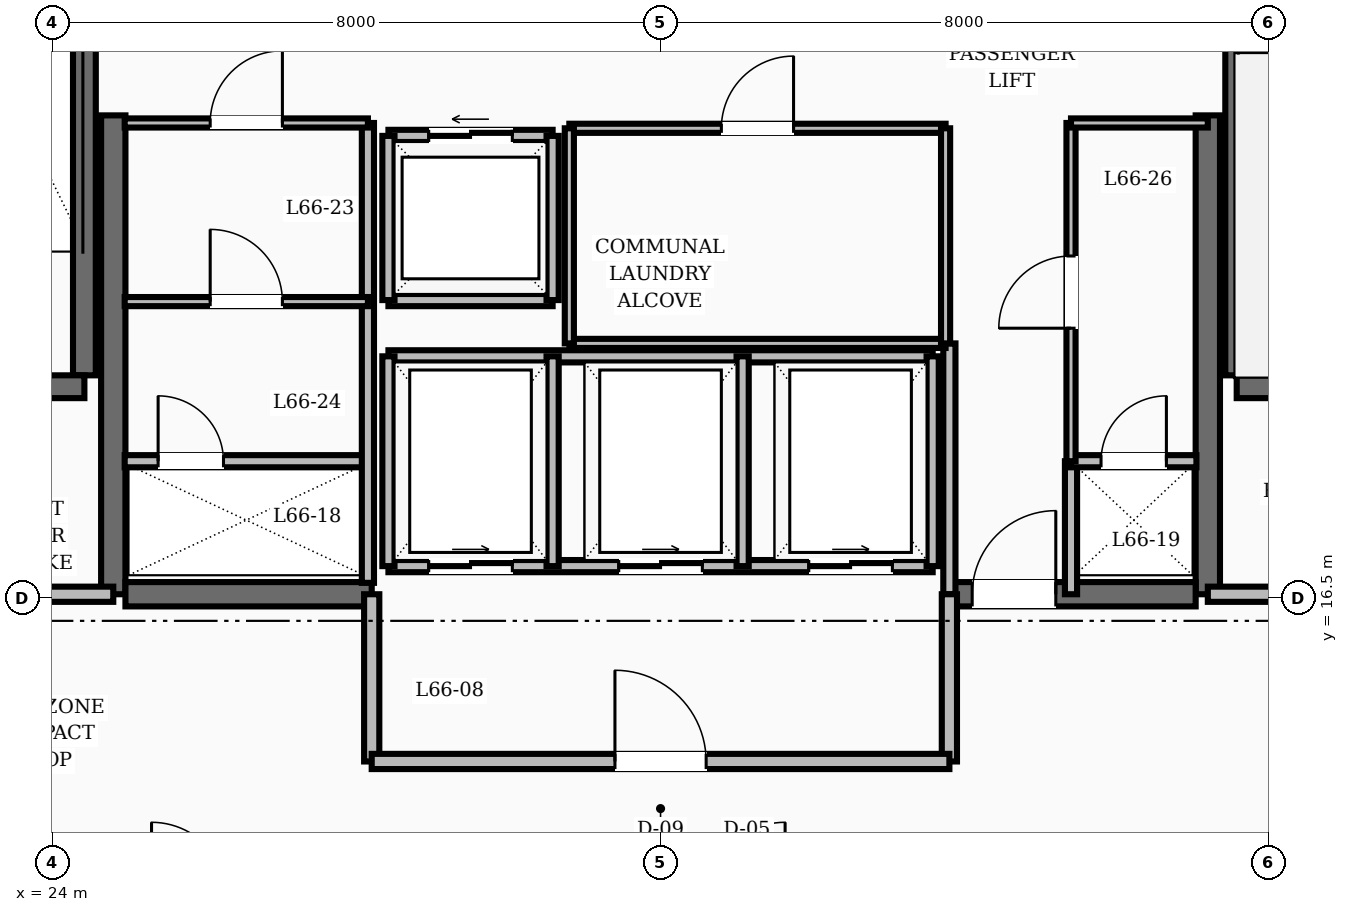
"""IFC4 building model, lengths in metres.
Left out: names, types, materials, properties, quantities, classifications, styles, units other than length and angle.
Written with IfcOpenShell. Run it as: python <this file> out.ifc"""

import sys

from ifc_helpers import new_model, si_unit, direction, frame, frame_2d, origin, place, context, subcontext, project, spatial, rectangle, extrude, element, fill, save


model = new_model("IFC4")
c1 = context("Model", 3, precision=1e-05, world=origin(), true_north=direction((0.0, 1.0)))
c2 = subcontext(c1, "Body", "Model", "MODEL_VIEW")
j1 = project(units=[si_unit("LENGTHUNIT", "METRE"), si_unit("PLANEANGLEUNIT", "RADIAN")], contexts=[c1])
p1 = place(None, origin())
s1 = spatial("IfcSite", under=j1, at=p1, CompositionType="ELEMENT")
p2 = place(p1, origin())
s2 = spatial("IfcBuilding", under=s1, at=p2, CompositionType="ELEMENT")
p3 = place(p2, frame((0.0, 0.0, 254.4)))
s3 = spatial("IfcBuildingStorey", under=s2, at=p3, CompositionType="ELEMENT", Elevation=254.4)
for number, where, z_axis, x_axis in (
    (1, (24.8, 16.55, 0.0), (0.0, 0.0, 1.0), (0.0, 1.0, 0.0)),
    (2, (39.2, 16.55, 0.0), (0.0, 0.0, 1.0), (0.0, 1.0, 0.0)),
):
    element("IfcWall", number, at=place(p3, frame(where, z_axis=z_axis, x_axis=x_axis)), inside=s3, PredefinedType="SHEAR", context=c2, shape_type="SweptSolid", body=[
        extrude(rectangle(XDim=6.3, YDim=0.32, at=frame_2d((3.15, 0.0))), origin(), (0.0, 0.0, 1.0), 3.6),
    ])
p4 = place(p3, frame((24.96, 16.55, 0.0), z_axis=(0.0, 0.0, 1.0), x_axis=(1.0, 0.0, 0.0)))
e3 = element("IfcWall", 3, at=p4, inside=s3, PredefinedType="SHEAR", context=c2, shape_type="SweptSolid", body=[
    extrude(rectangle(XDim=3.24, YDim=0.32, at=frame_2d((1.62, 0.0))), origin(), (0.0, 0.0, 1.0), 3.6),
])
p5 = place(p3, frame((35.8, 16.55, 0.0), z_axis=(0.0, 0.0, 1.0), x_axis=(1.0, 0.0, 0.0)))
e4 = element("IfcWall", 4, at=p5, inside=s3, PredefinedType="SHEAR", context=c2, shape_type="SweptSolid", body=[
    extrude(rectangle(XDim=3.24, YDim=0.32, at=frame_2d((1.62, 0.0))), origin(), (0.0, 0.0, 1.0), 3.6),
])
p6 = place(p5, frame((0.3, 0.0, 0.0)))
e5 = element("IfcOpeningElement", 5, at=p6, cuts=e4, PredefinedType="OPENING", context=c2, shape_type="SweptSolid", body=[
    extrude(rectangle(XDim=1.1, YDim=2.1, at=frame_2d((0.55, 1.05))), frame((0.0, 0.17, 0.0), z_axis=(0.0, -1.0, 0.0), x_axis=(1.0, 0.0, 0.0)), (0.0, 0.0, 1.0), 0.34),
])
p7 = place(p3, frame((24.42, 19.43, 0.0), z_axis=(0.0, 0.0, 1.0), x_axis=(0.0, 1.0, 0.0)))
e6 = element("IfcWall", 6, at=p7, inside=s3, PredefinedType="SHEAR", context=c2, shape_type="SweptSolid", body=[
    extrude(rectangle(XDim=8.74, YDim=0.3, at=frame_2d((4.37, 0.0))), origin(), (0.0, 0.0, 1.0), 3.6),
])
p8 = place(p3, frame((20.82, 19.28, 0.0), z_axis=(0.0, 0.0, 1.0), x_axis=(1.0, 0.0, 0.0)))
e7 = element("IfcWall", 7, at=p8, inside=s3, PredefinedType="SHEAR", context=c2, shape_type="SweptSolid", body=[
    extrude(rectangle(XDim=3.6, YDim=0.3, at=frame_2d((1.8, 0.0))), origin(), (0.0, 0.0, 1.0), 3.6),
])
p9 = place(p8, frame((1.3, 0.0, 0.0)))
e8 = element("IfcOpeningElement", 8, at=p9, cuts=e7, PredefinedType="OPENING", context=c2, shape_type="SweptSolid", body=[
    extrude(rectangle(XDim=1.1, YDim=2.1, at=frame_2d((0.55, 1.05))), frame((0.0, 0.16, 0.0), z_axis=(0.0, -1.0, 0.0), x_axis=(1.0, 0.0, 0.0)), (0.0, 0.0, 1.0), 0.32),
])
p10 = place(p3, frame((39.58, 19.43, 0.0), z_axis=(0.0, 0.0, 1.0), x_axis=(0.0, 1.0, 0.0)))
e9 = element("IfcWall", 9, at=p10, inside=s3, PredefinedType="SHEAR", context=c2, shape_type="SweptSolid", body=[
    extrude(rectangle(XDim=8.74, YDim=0.3, at=frame_2d((4.37, 0.0))), origin(), (0.0, 0.0, 1.0), 3.6),
])
p11 = place(p3, frame((39.58, 19.28, 0.0), z_axis=(0.0, 0.0, 1.0), x_axis=(1.0, 0.0, 0.0)))
e10 = element("IfcWall", 10, at=p11, inside=s3, PredefinedType="SHEAR", context=c2, shape_type="SweptSolid", body=[
    extrude(rectangle(XDim=3.6, YDim=0.3, at=frame_2d((1.8, 0.0))), origin(), (0.0, 0.0, 1.0), 3.6),
])
for number, where, z_axis, x_axis in (
    (11, (20.82, 16.55, 0.0), (0.0, 0.0, 1.0), (1.0, 0.0, 0.0)),
    (12, (39.2, 16.55, 0.0), (0.0, 0.0, 1.0), (1.0, 0.0, 0.0)),
):
    element("IfcWall", number, at=place(p3, frame(where, z_axis=z_axis, x_axis=x_axis)), inside=s3, PredefinedType="SOLIDWALL", context=c2, shape_type="SweptSolid", body=[
        extrude(rectangle(XDim=3.98, YDim=0.2, at=frame_2d((1.99, 0.0))), origin(), (0.0, 0.0, 1.0), 2.87),
    ])
p12 = place(p3, frame((35.8, 16.55, 0.0), z_axis=(0.0, 0.0, 1.0), x_axis=(0.0, 1.0, 0.0)))
e13 = element("IfcWall", 13, at=p12, inside=s3, PredefinedType="SOLIDWALL", context=c2, shape_type="SweptSolid", body=[
    extrude(rectangle(XDim=3.3, YDim=0.16, at=frame_2d((1.65, 0.0))), origin(), (0.0, 0.0, 1.0), 2.87),
])
p13 = place(p3, frame((37.4, 16.55, 0.0), z_axis=(0.0, 0.0, 1.0), x_axis=(0.0, 1.0, 0.0)))
e14 = element("IfcWall", 14, at=p13, inside=s3, PredefinedType="SOLIDWALL", context=c2, shape_type="SweptSolid", body=[
    extrude(rectangle(XDim=1.75, YDim=0.16, at=frame_2d((0.875, 0.0))), origin(), (0.0, 0.0, 1.0), 2.87),
])
for number, where, z_axis, x_axis in (
    (15, (28.2, 14.35, 0.0), (0.0, 0.0, 1.0), (0.0, 1.0, 0.0)),
    (16, (35.8, 14.35, 0.0), (0.0, 0.0, 1.0), (0.0, 1.0, 0.0)),
):
    element("IfcWall", number, at=place(p3, frame(where, z_axis=z_axis, x_axis=x_axis)), inside=s3, PredefinedType="SOLIDWALL", context=c2, shape_type="SweptSolid", body=[
        extrude(rectangle(XDim=2.2, YDim=0.2, at=frame_2d((1.1, 0.0))), origin(), (0.0, 0.0, 1.0), 2.87),
    ])
p14 = place(p3, frame((28.2, 14.35, 0.0), z_axis=(0.0, 0.0, 1.0), x_axis=(1.0, 0.0, 0.0)))
e17 = element("IfcWall", 17, at=p14, inside=s3, PredefinedType="SOLIDWALL", context=c2, shape_type="SweptSolid", body=[
    extrude(rectangle(XDim=7.6, YDim=0.2, at=frame_2d((3.8, 0.0))), origin(), (0.0, 0.0, 1.0), 2.87),
])
p15 = place(p14, frame((3.2, 0.0, 0.0)))
e18 = element("IfcOpeningElement", 18, at=p15, cuts=e17, PredefinedType="OPENING", context=c2, shape_type="SweptSolid", body=[
    extrude(rectangle(XDim=1.2, YDim=2.1, at=frame_2d((0.6, 1.05))), frame((0.0, 0.11, 0.0), z_axis=(0.0, -1.0, 0.0), x_axis=(1.0, 0.0, 0.0)), (0.0, 0.0, 1.0), 0.22),
])
p16 = place(p3, frame((28.42, 22.58, 0.0), z_axis=(0.0, 0.0, 1.0), x_axis=(1.0, 0.0, 0.0)))
e19 = element("IfcWall", 19, at=p16, inside=s3, PredefinedType="SOLIDWALL", context=c2, shape_type="SweptSolid", body=[
    extrude(rectangle(XDim=2.16, YDim=0.16, at=frame_2d((1.08, 0.0))), origin(), (0.0, 0.0, 1.0), 2.87),
])
p17 = place(p16, frame((0.53, 0.0, 0.0)))
e20 = element("IfcOpeningElement", 20, at=p17, cuts=e19, PredefinedType="OPENING", context=c2, shape_type="SweptSolid", body=[
    extrude(rectangle(XDim=1.1, YDim=2.15, at=frame_2d((0.55, 1.075))), frame((0.0, 0.09, 0.0), z_axis=(0.0, -1.0, 0.0), x_axis=(1.0, 0.0, 0.0)), (0.0, 0.0, 1.0), 0.18),
])
for number, where, z_axis, x_axis in (
    (21, (28.42, 20.42, 0.0), (0.0, 0.0, 1.0), (1.0, 0.0, 0.0)),
    (22, (28.42, 20.42, 0.0), (0.0, 0.0, 1.0), (0.0, 1.0, 0.0)),
    (23, (30.58, 20.42, 0.0), (0.0, 0.0, 1.0), (0.0, 1.0, 0.0)),
):
    element("IfcWall", number, at=place(p3, frame(where, z_axis=z_axis, x_axis=x_axis)), inside=s3, PredefinedType="SOLIDWALL", context=c2, shape_type="SweptSolid", body=[
        extrude(rectangle(XDim=2.16, YDim=0.16, at=frame_2d((1.08, 0.0))), origin(), (0.0, 0.0, 1.0), 2.87),
    ])
p18 = place(p3, frame((28.42, 16.92, 0.0), z_axis=(0.0, 0.0, 1.0), x_axis=(1.0, 0.0, 0.0)))
e24 = element("IfcWall", 24, at=p18, inside=s3, PredefinedType="SOLIDWALL", context=c2, shape_type="SweptSolid", body=[
    extrude(rectangle(XDim=7.16, YDim=0.16, at=frame_2d((3.58, 0.0))), origin(), (0.0, 0.0, 1.0), 2.87),
])
p19 = place(p18, frame((0.53, 0.0, 0.0)))
e25 = element("IfcOpeningElement", 25, at=p19, cuts=e24, PredefinedType="OPENING", context=c2, shape_type="SweptSolid", body=[
    extrude(rectangle(XDim=1.1, YDim=2.15, at=frame_2d((0.55, 1.075))), frame((0.0, 0.09, 0.0), z_axis=(0.0, -1.0, 0.0), x_axis=(1.0, 0.0, 0.0)), (0.0, 0.0, 1.0), 0.18),
])
p20 = place(p18, frame((3.03, 0.0, 0.0)))
e26 = element("IfcOpeningElement", 26, at=p20, cuts=e24, PredefinedType="OPENING", context=c2, shape_type="SweptSolid", body=[
    extrude(rectangle(XDim=1.1, YDim=2.15, at=frame_2d((0.55, 1.075))), frame((0.0, 0.09, 0.0), z_axis=(0.0, -1.0, 0.0), x_axis=(1.0, 0.0, 0.0)), (0.0, 0.0, 1.0), 0.18),
])
p21 = place(p18, frame((5.53, 0.0, 0.0)))
e27 = element("IfcOpeningElement", 27, at=p21, cuts=e24, PredefinedType="OPENING", context=c2, shape_type="SweptSolid", body=[
    extrude(rectangle(XDim=1.1, YDim=2.15, at=frame_2d((0.55, 1.075))), frame((0.0, 0.09, 0.0), z_axis=(0.0, -1.0, 0.0), x_axis=(1.0, 0.0, 0.0)), (0.0, 0.0, 1.0), 0.18),
])
p22 = place(p3, frame((28.42, 19.68, 0.0), z_axis=(0.0, 0.0, 1.0), x_axis=(1.0, 0.0, 0.0)))
e28 = element("IfcWall", 28, at=p22, inside=s3, PredefinedType="SOLIDWALL", context=c2, shape_type="SweptSolid", body=[
    extrude(rectangle(XDim=7.16, YDim=0.16, at=frame_2d((3.58, 0.0))), origin(), (0.0, 0.0, 1.0), 2.87),
])
for number, where, z_axis, x_axis in (
    (29, (28.42, 16.92, 0.0), (0.0, 0.0, 1.0), (0.0, 1.0, 0.0)),
    (30, (30.58, 16.92, 0.0), (0.0, 0.0, 1.0), (0.0, 1.0, 0.0)),
    (31, (33.08, 16.92, 0.0), (0.0, 0.0, 1.0), (0.0, 1.0, 0.0)),
    (32, (35.58, 16.92, 0.0), (0.0, 0.0, 1.0), (0.0, 1.0, 0.0)),
):
    element("IfcWall", number, at=place(p3, frame(where, z_axis=z_axis, x_axis=x_axis)), inside=s3, PredefinedType="SOLIDWALL", context=c2, shape_type="SweptSolid", body=[
        extrude(rectangle(XDim=2.76, YDim=0.16, at=frame_2d((1.38, 0.0))), origin(), (0.0, 0.0, 1.0), 2.87),
    ])
p23 = place(p3, frame((30.8, 22.68, 0.0), z_axis=(0.0, 0.0, 1.0), x_axis=(1.0, 0.0, 0.0)))
e33 = element("IfcWall", 33, at=p23, inside=s3, PredefinedType="PARTITIONING", context=c2, shape_type="SweptSolid", body=[
    extrude(rectangle(XDim=4.95, YDim=0.12, at=frame_2d((2.475, 0.0))), origin(), (0.0, 0.0, 1.0), 2.87),
])
p24 = place(p23, frame((2.0, 0.0, 0.0)))
e34 = element("IfcOpeningElement", 34, at=p24, cuts=e33, PredefinedType="OPENING", context=c2, shape_type="SweptSolid", body=[
    extrude(rectangle(XDim=0.95, YDim=2.1, at=frame_2d((0.475, 1.05))), frame((0.0, 0.07, 0.0), z_axis=(0.0, -1.0, 0.0), x_axis=(1.0, 0.0, 0.0)), (0.0, 0.0, 1.0), 0.14),
])
p25 = place(p3, frame((30.8, 19.85, 0.0), z_axis=(0.0, 0.0, 1.0), x_axis=(1.0, 0.0, 0.0)))
e35 = element("IfcWall", 35, at=p25, inside=s3, PredefinedType="PARTITIONING", context=c2, shape_type="SweptSolid", body=[
    extrude(rectangle(XDim=4.95, YDim=0.12, at=frame_2d((2.475, 0.0))), origin(), (0.0, 0.0, 1.0), 2.87),
])
for number, where, z_axis, x_axis in (
    (36, (30.8, 19.85, 0.0), (0.0, 0.0, 1.0), (0.0, 1.0, 0.0)),
    (37, (35.75, 19.85, 0.0), (0.0, 0.0, 1.0), (0.0, 1.0, 0.0)),
):
    element("IfcWall", number, at=place(p3, frame(where, z_axis=z_axis, x_axis=x_axis)), inside=s3, PredefinedType="PARTITIONING", context=c2, shape_type="SweptSolid", body=[
        extrude(rectangle(XDim=2.83, YDim=0.12, at=frame_2d((1.415, 0.0))), origin(), (0.0, 0.0, 1.0), 2.87),
    ])
p26 = place(p3, frame((24.95, 18.3, 0.0), z_axis=(0.0, 0.0, 1.0), x_axis=(1.0, 0.0, 0.0)))
e38 = element("IfcWall", 38, at=p26, inside=s3, PredefinedType="SOLIDWALL", context=c2, shape_type="SweptSolid", body=[
    extrude(rectangle(XDim=3.2, YDim=0.16, at=frame_2d((1.6, 0.0))), origin(), (0.0, 0.0, 1.0), 2.87),
])
p27 = place(p26, frame((0.44, 0.0, 0.0)))
e39 = element("IfcOpeningElement", 39, at=p27, cuts=e38, PredefinedType="OPENING", context=c2, shape_type="SweptSolid", body=[
    extrude(rectangle(XDim=0.86, YDim=2.05, at=frame_2d((0.43, 1.025))), frame((0.0, 0.09, 0.0), z_axis=(0.0, -1.0, 0.0), x_axis=(1.0, 0.0, 0.0)), (0.0, 0.0, 1.0), 0.18),
])
p28 = place(p3, frame((28.15, 16.7, 0.0), z_axis=(0.0, 0.0, 1.0), x_axis=(0.0, 1.0, 0.0)))
e40 = element("IfcWall", 40, at=p28, inside=s3, PredefinedType="SOLIDWALL", context=c2, shape_type="SweptSolid", body=[
    extrude(rectangle(XDim=6.05, YDim=0.16, at=frame_2d((3.025, 0.0))), origin(), (0.0, 0.0, 1.0), 2.87),
])
p29 = place(p3, frame((37.4, 18.3, 0.0), z_axis=(0.0, 0.0, 1.0), x_axis=(1.0, 0.0, 0.0)))
e41 = element("IfcWall", 41, at=p29, inside=s3, PredefinedType="SOLIDWALL", context=c2, shape_type="SweptSolid", body=[
    extrude(rectangle(XDim=1.65, YDim=0.16, at=frame_2d((0.825, 0.0))), origin(), (0.0, 0.0, 1.0), 2.87),
])
p30 = place(p29, frame((0.395, 0.0, 0.0)))
e42 = element("IfcOpeningElement", 42, at=p30, cuts=e41, PredefinedType="OPENING", context=c2, shape_type="SweptSolid", body=[
    extrude(rectangle(XDim=0.86, YDim=2.1, at=frame_2d((0.43, 1.05))), frame((0.0, 0.09, 0.0), z_axis=(0.0, -1.0, 0.0), x_axis=(1.0, 0.0, 0.0)), (0.0, 0.0, 1.0), 0.18),
])
p31 = place(p3, frame((24.95, 22.75, 0.0), z_axis=(0.0, 0.0, 1.0), x_axis=(1.0, 0.0, 0.0)))
e43 = element("IfcWall", 43, at=p31, inside=s3, PredefinedType="PARTITIONING", context=c2, shape_type="SweptSolid", body=[
    extrude(rectangle(XDim=3.2, YDim=0.12, at=frame_2d((1.6, 0.0))), origin(), (0.0, 0.0, 1.0), 2.87),
])
p32 = place(p31, frame((1.125, 0.0, 0.0)))
e44 = element("IfcOpeningElement", 44, at=p32, cuts=e43, PredefinedType="OPENING", context=c2, shape_type="SweptSolid", body=[
    extrude(rectangle(XDim=0.95, YDim=2.1, at=frame_2d((0.475, 1.05))), frame((0.0, 0.07, 0.0), z_axis=(0.0, -1.0, 0.0), x_axis=(1.0, 0.0, 0.0)), (0.0, 0.0, 1.0), 0.14),
])
p33 = place(p3, frame((37.4, 18.3, 0.0), z_axis=(0.0, 0.0, 1.0), x_axis=(0.0, 1.0, 0.0)))
e45 = element("IfcWall", 45, at=p33, inside=s3, PredefinedType="PARTITIONING", context=c2, shape_type="SweptSolid", body=[
    extrude(rectangle(XDim=4.45, YDim=0.12, at=frame_2d((2.225, 0.0))), origin(), (0.0, 0.0, 1.0), 2.87),
])
p34 = place(p33, frame((1.75, 0.0, 0.0)))
e46 = element("IfcOpeningElement", 46, at=p34, cuts=e45, PredefinedType="OPENING", context=c2, shape_type="SweptSolid", body=[
    extrude(rectangle(XDim=0.95, YDim=2.1, at=frame_2d((0.475, 1.05))), frame((0.0, 0.07, 0.0), z_axis=(0.0, -1.0, 0.0), x_axis=(1.0, 0.0, 0.0)), (0.0, 0.0, 1.0), 0.14),
])
p35 = place(p3, frame((37.4, 22.75, 0.0), z_axis=(0.0, 0.0, 1.0), x_axis=(1.0, 0.0, 0.0)))
e47 = element("IfcWall", 47, at=p35, inside=s3, PredefinedType="PARTITIONING", context=c2, shape_type="SweptSolid", body=[
    extrude(rectangle(XDim=1.8, YDim=0.12, at=frame_2d((0.9, 0.0))), origin(), (0.0, 0.0, 1.0), 2.87),
])
p36 = place(p3, frame((24.95, 20.4, 0.0), z_axis=(0.0, 0.0, 1.0), x_axis=(1.0, 0.0, 0.0)))
e48 = element("IfcWall", 48, at=p36, inside=s3, PredefinedType="PARTITIONING", context=c2, shape_type="SweptSolid", body=[
    extrude(rectangle(XDim=3.2, YDim=0.12, at=frame_2d((1.6, 0.0))), origin(), (0.0, 0.0, 1.0), 2.87),
])
p37 = place(p36, frame((1.125, 0.0, 0.0)))
e49 = element("IfcOpeningElement", 49, at=p37, cuts=e48, PredefinedType="OPENING", context=c2, shape_type="SweptSolid", body=[
    extrude(rectangle(XDim=0.95, YDim=2.1, at=frame_2d((0.475, 1.05))), frame((0.0, 0.07, 0.0), z_axis=(0.0, -1.0, 0.0), x_axis=(1.0, 0.0, 0.0)), (0.0, 0.0, 1.0), 0.14),
])
p38 = place(p3, frame((21.635, 13.635, 0.0), z_axis=(0.0, 0.0, 1.0), x_axis=(0.92856882165, -0.371160266542, 0.0)))
e50 = element("IfcWall", 50, at=p38, inside=s3, PredefinedType="SOLIDWALL", context=c2, shape_type="SweptSolid", body=[
    extrude(rectangle(XDim=2.923, YDim=0.16, at=frame_2d((1.461, 0.0))), origin(), (0.0, 0.0, 1.0), 2.87),
])
p39 = place(p3, frame((39.651, 12.55, 0.0), z_axis=(0.0, 0.0, 1.0), x_axis=(0.92856882165, 0.371160266542, 0.0)))
e51 = element("IfcWall", 51, at=p39, inside=s3, PredefinedType="SOLIDWALL", context=c2, shape_type="SweptSolid", body=[
    extrude(rectangle(XDim=2.923, YDim=0.16, at=frame_2d((1.461, 0.0))), origin(), (0.0, 0.0, 1.0), 2.87),
])
p40 = place(p39, frame((0.987, 0.0, 0.0)))
e52 = element("IfcOpeningElement", 52, at=p40, cuts=e51, PredefinedType="OPENING", context=c2, shape_type="SweptSolid", body=[
    extrude(rectangle(XDim=0.95, YDim=2.1, at=frame_2d((0.475, 1.05))), frame((0.0, 0.09, 0.0), z_axis=(0.0, -1.0, 0.0), x_axis=(1.0, 0.0, 0.0)), (0.0, 0.0, 1.0), 0.18),
])
p41 = place(p6, origin())
e53 = element("IfcDoor", 53, at=p41, inside=s3, OperationType="SINGLE_SWING_RIGHT", PredefinedType="DOOR", context=c2, shape_type="SweptSolid", body=[
    extrude(rectangle(XDim=1.1, YDim=2.1, at=frame_2d((0.55, 1.05))), frame((0.0, 0.025, 0.0), z_axis=(0.0, -1.0, 0.0), x_axis=(1.0, 0.0, 0.0)), (0.0, 0.0, 1.0), 0.05),
])
fill(e5, e53)
p42 = place(p15, origin())
e54 = element("IfcDoor", 54, at=p42, inside=s3, OperationType="SINGLE_SWING_LEFT", PredefinedType="DOOR", context=c2, shape_type="SweptSolid", body=[
    extrude(rectangle(XDim=1.2, YDim=2.1, at=frame_2d((0.6, 1.05))), frame((0.0, 0.025, 0.0), z_axis=(0.0, -1.0, 0.0), x_axis=(1.0, 0.0, 0.0)), (0.0, 0.0, 1.0), 0.05),
])
fill(e18, e54)
p43 = place(p17, origin())
e55 = element("IfcDoor", 55, at=p43, inside=s3, OperationType="SLIDING_TO_LEFT", PredefinedType="DOOR", context=c2, shape_type="SweptSolid", body=[
    extrude(rectangle(XDim=1.1, YDim=2.15, at=frame_2d((0.55, 1.075))), frame((0.0, 0.025, 0.0), z_axis=(0.0, -1.0, 0.0), x_axis=(1.0, 0.0, 0.0)), (0.0, 0.0, 1.0), 0.05),
])
fill(e20, e55)
p44 = place(p19, origin())
e56 = element("IfcDoor", 56, at=p44, inside=s3, OperationType="SLIDING_TO_RIGHT", PredefinedType="DOOR", context=c2, shape_type="SweptSolid", body=[
    extrude(rectangle(XDim=1.1, YDim=2.15, at=frame_2d((0.55, 1.075))), frame((0.0, 0.025, 0.0), z_axis=(0.0, -1.0, 0.0), x_axis=(1.0, 0.0, 0.0)), (0.0, 0.0, 1.0), 0.05),
])
fill(e25, e56)
p45 = place(p20, origin())
e57 = element("IfcDoor", 57, at=p45, inside=s3, OperationType="SLIDING_TO_RIGHT", PredefinedType="DOOR", context=c2, shape_type="SweptSolid", body=[
    extrude(rectangle(XDim=1.1, YDim=2.15, at=frame_2d((0.55, 1.075))), frame((0.0, 0.025, 0.0), z_axis=(0.0, -1.0, 0.0), x_axis=(1.0, 0.0, 0.0)), (0.0, 0.0, 1.0), 0.05),
])
fill(e26, e57)
p46 = place(p21, origin())
e58 = element("IfcDoor", 58, at=p46, inside=s3, OperationType="SLIDING_TO_RIGHT", PredefinedType="DOOR", context=c2, shape_type="SweptSolid", body=[
    extrude(rectangle(XDim=1.1, YDim=2.15, at=frame_2d((0.55, 1.075))), frame((0.0, 0.025, 0.0), z_axis=(0.0, -1.0, 0.0), x_axis=(1.0, 0.0, 0.0)), (0.0, 0.0, 1.0), 0.05),
])
fill(e27, e58)
p47 = place(p24, origin())
e59 = element("IfcDoor", 59, at=p47, inside=s3, OperationType="SINGLE_SWING_RIGHT", PredefinedType="DOOR", context=c2, shape_type="SweptSolid", body=[
    extrude(rectangle(XDim=0.95, YDim=2.1, at=frame_2d((0.475, 1.05))), frame((0.0, 0.025, 0.0), z_axis=(0.0, -1.0, 0.0), x_axis=(1.0, 0.0, 0.0)), (0.0, 0.0, 1.0), 0.05),
])
fill(e34, e59)
p48 = place(p27, origin())
e60 = element("IfcDoor", 60, at=p48, inside=s3, OperationType="SINGLE_SWING_LEFT", PredefinedType="TRAPDOOR", context=c2, shape_type="SweptSolid", body=[
    extrude(rectangle(XDim=0.86, YDim=2.05, at=frame_2d((0.43, 1.025))), frame((0.0, 0.025, 0.0), z_axis=(0.0, -1.0, 0.0), x_axis=(1.0, 0.0, 0.0)), (0.0, 0.0, 1.0), 0.05),
])
fill(e39, e60)
p49 = place(p30, origin())
e61 = element("IfcDoor", 61, at=p49, inside=s3, OperationType="SINGLE_SWING_RIGHT", PredefinedType="TRAPDOOR", context=c2, shape_type="SweptSolid", body=[
    extrude(rectangle(XDim=0.86, YDim=2.1, at=frame_2d((0.43, 1.05))), frame((0.0, 0.025, 0.0), z_axis=(0.0, -1.0, 0.0), x_axis=(1.0, 0.0, 0.0)), (0.0, 0.0, 1.0), 0.05),
])
fill(e42, e61)
p50 = place(p32, origin())
e62 = element("IfcDoor", 62, at=p50, inside=s3, OperationType="SINGLE_SWING_RIGHT", PredefinedType="DOOR", context=c2, shape_type="SweptSolid", body=[
    extrude(rectangle(XDim=0.95, YDim=2.1, at=frame_2d((0.475, 1.05))), frame((0.0, 0.025, 0.0), z_axis=(0.0, -1.0, 0.0), x_axis=(1.0, 0.0, 0.0)), (0.0, 0.0, 1.0), 0.05),
])
fill(e44, e62)
p51 = place(p37, origin())
e63 = element("IfcDoor", 63, at=p51, inside=s3, OperationType="SINGLE_SWING_LEFT", PredefinedType="DOOR", context=c2, shape_type="SweptSolid", body=[
    extrude(rectangle(XDim=0.95, YDim=2.1, at=frame_2d((0.475, 1.05))), frame((0.0, 0.025, 0.0), z_axis=(0.0, -1.0, 0.0), x_axis=(1.0, 0.0, 0.0)), (0.0, 0.0, 1.0), 0.05),
])
fill(e49, e63)
p52 = place(p34, origin())
e64 = element("IfcDoor", 64, at=p52, inside=s3, OperationType="SINGLE_SWING_LEFT", PredefinedType="DOOR", context=c2, shape_type="SweptSolid", body=[
    extrude(rectangle(XDim=0.95, YDim=2.1, at=frame_2d((0.475, 1.05))), frame((0.0, 0.025, 0.0), z_axis=(0.0, -1.0, 0.0), x_axis=(1.0, 0.0, 0.0)), (0.0, 0.0, 1.0), 0.05),
])
fill(e46, e64)
save(model, sys.argv[1])
